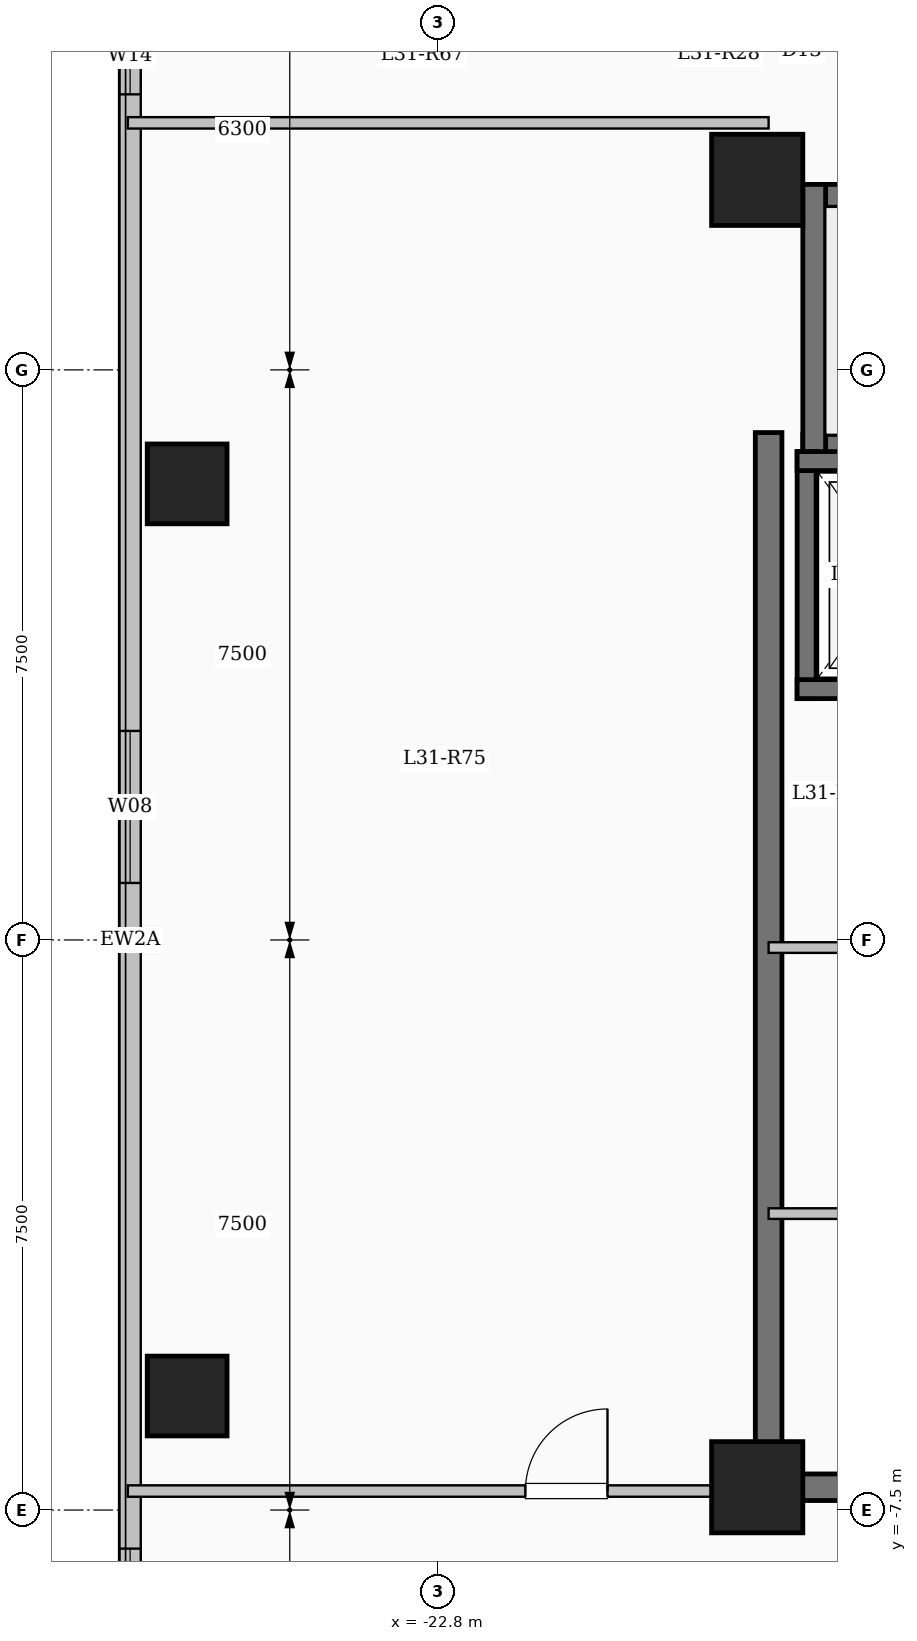
"""IFC4 building model, lengths in metres.
Left out: names, types, materials, properties, quantities, classifications, styles, units other than length and angle.
Written with IfcOpenShell. Run it as: python <this file> out.ifc"""

import sys

from ifc_helpers import new_model, si_unit, direction, frame, frame_2d, origin, origin_2d, place, context, subcontext, project, spatial, rectangle, extrude, element, fill, save


model = new_model("IFC4")
c1 = context("Model", 3, precision=1e-05, world=origin(), true_north=direction((0.0, 1.0)))
c2 = subcontext(c1, "Body", "Model", "MODEL_VIEW")
j1 = project(units=[si_unit("LENGTHUNIT", "METRE"), si_unit("PLANEANGLEUNIT", "RADIAN")], contexts=[c1])
p1 = place(None, origin())
s1 = spatial("IfcSite", under=j1, at=p1, CompositionType="ELEMENT")
p2 = place(p1, origin())
s2 = spatial("IfcBuilding", under=s1, at=p2, CompositionType="ELEMENT")
p3 = place(p2, frame((0.0, 0.0, 115.15)))
s3 = spatial("IfcBuildingStorey", under=s2, at=p3, CompositionType="ELEMENT", Elevation=115.15)
for number, where, z_axis, x_axis in (
    (1, (-18.6, -7.2, 0.0), (0.0, 0.0, 1.0), (1.0, 0.0, 0.0)),
    (2, (-18.6, 10.0, 0.0), (0.0, 0.0, 1.0), (1.0, 0.0, 0.0)),
):
    element("IfcColumn", number, at=place(p3, frame(where, z_axis=z_axis, x_axis=x_axis)), inside=s3, PredefinedType="COLUMN", context=c2, shape_type="SweptSolid", body=[
        extrude(rectangle(XDim=1.2, YDim=1.2, at=origin_2d()), origin(), (0.0, 0.0, 1.0), 3.35),
    ])
for number, where, z_axis, x_axis in (
    (3, (-26.1, -6.0, 0.0), (0.0, 0.0, 1.0), (1.0, 0.0, 0.0)),
    (4, (-26.1, 6.0, 0.0), (0.0, 0.0, 1.0), (1.0, 0.0, 0.0)),
):
    element("IfcColumn", number, at=place(p3, frame(where, z_axis=z_axis, x_axis=x_axis)), inside=s3, PredefinedType="COLUMN", context=c2, shape_type="SweptSolid", body=[
        extrude(rectangle(XDim=1.05, YDim=1.05, at=origin_2d()), origin(), (0.0, 0.0, 1.0), 3.35),
    ])
p4 = place(p3, frame((-26.85, -17.85, 0.0), z_axis=(0.0, 0.0, 1.0), x_axis=(0.0, 1.0, 0.0)))
e5 = element("IfcWall", 5, at=p4, inside=s3, PredefinedType="SOLIDWALL", context=c2, shape_type="SweptSolid", body=[
    extrude(rectangle(XDim=35.7, YDim=0.28, at=frame_2d((17.85, 0.0))), origin(), (0.0, 0.0, 1.0), 3.05),
])
p5 = place(p4, frame((2.55, 0.0, 0.9)))
e6 = element("IfcOpeningElement", 6, at=p5, cuts=e5, PredefinedType="OPENING", context=c2, shape_type="SweptSolid", body=[
    extrude(rectangle(XDim=2.4, YDim=1.8, at=frame_2d((1.2, 0.9))), frame((0.0, 0.15, 0.0), z_axis=(0.0, -1.0, 0.0), x_axis=(1.0, 0.0, 0.0)), (0.0, 0.0, 1.0), 0.3),
])
p6 = place(p4, frame((8.343, 0.0, 0.9)))
e7 = element("IfcOpeningElement", 7, at=p6, cuts=e5, PredefinedType="OPENING", context=c2, shape_type="SweptSolid", body=[
    extrude(rectangle(XDim=1.5, YDim=1.65, at=frame_2d((0.75, 0.825))), frame((0.0, 0.15, 0.0), z_axis=(0.0, -1.0, 0.0), x_axis=(1.0, 0.0, 0.0)), (0.0, 0.0, 1.0), 0.3),
])
p7 = place(p4, frame((18.6, 0.0, 0.9)))
e8 = element("IfcOpeningElement", 8, at=p7, cuts=e5, PredefinedType="OPENING", context=c2, shape_type="SweptSolid", body=[
    extrude(rectangle(XDim=2.0, YDim=1.7, at=frame_2d((1.0, 0.85))), frame((0.0, 0.15, 0.0), z_axis=(0.0, -1.0, 0.0), x_axis=(1.0, 0.0, 0.0)), (0.0, 0.0, 1.0), 0.3),
])
p8 = place(p4, frame((28.975, 0.0, 0.95)))
e9 = element("IfcOpeningElement", 9, at=p8, cuts=e5, PredefinedType="OPENING", context=c2, shape_type="SweptSolid", body=[
    extrude(rectangle(XDim=1.0, YDim=1.5, at=frame_2d((0.5, 0.75))), frame((0.0, 0.15, 0.0), z_axis=(0.0, -1.0, 0.0), x_axis=(1.0, 0.0, 0.0)), (0.0, 0.0, 1.0), 0.3),
])
p9 = place(p4, frame((32.025, 0.0, 0.9)))
e10 = element("IfcOpeningElement", 10, at=p9, cuts=e5, PredefinedType="OPENING", context=c2, shape_type="SweptSolid", body=[
    extrude(rectangle(XDim=2.0, YDim=1.7, at=frame_2d((1.0, 0.85))), frame((0.0, 0.15, 0.0), z_axis=(0.0, -1.0, 0.0), x_axis=(1.0, 0.0, 0.0)), (0.0, 0.0, 1.0), 0.3),
])
p10 = place(p3, frame((-18.0, 9.79, 0.0), z_axis=(0.0, 0.0, 1.0), x_axis=(1.0, 0.0, 0.0)))
e11 = element("IfcWall", 11, at=p10, inside=s3, PredefinedType="SHEAR", context=c2, shape_type="SweptSolid", body=[
    extrude(rectangle(XDim=8.0, YDim=0.3, at=frame_2d((4.0, 0.0))), origin(), (0.0, 0.0, 1.0), 3.35),
])
p11 = place(p3, frame((-18.0, 6.5, 0.0), z_axis=(0.0, 0.0, 1.0), x_axis=(1.0, 0.0, 0.0)))
e12 = element("IfcWall", 12, at=p11, inside=s3, PredefinedType="SHEAR", context=c2, shape_type="SweptSolid", body=[
    extrude(rectangle(XDim=8.0, YDim=0.3, at=frame_2d((4.0, 0.0))), origin(), (0.0, 0.0, 1.0), 3.35),
])
p12 = place(p11, frame((6.45, 0.0, 0.0)))
e13 = element("IfcOpeningElement", 13, at=p12, cuts=e12, PredefinedType="OPENING", context=c2, shape_type="SweptSolid", body=[
    extrude(rectangle(XDim=1.0, YDim=2.15, at=frame_2d((0.5, 1.075))), frame((0.0, 0.16, 0.0), z_axis=(0.0, -1.0, 0.0), x_axis=(1.0, 0.0, 0.0)), (0.0, 0.0, 1.0), 0.32),
])
p13 = place(p3, frame((-17.85, 6.35, 0.0), z_axis=(0.0, 0.0, 1.0), x_axis=(0.0, 1.0, 0.0)))
e14 = element("IfcWall", 14, at=p13, inside=s3, PredefinedType="SHEAR", context=c2, shape_type="SweptSolid", body=[
    extrude(rectangle(XDim=3.59, YDim=0.3, at=frame_2d((1.795, 0.0))), origin(), (0.0, 0.0, 1.0), 3.35),
])
p14 = place(p3, frame((-17.95, 3.175, 0.0), z_axis=(0.0, 0.0, 1.0), x_axis=(0.0, 1.0, 0.0)))
e15 = element("IfcWall", 15, at=p14, inside=s3, PredefinedType="SHEAR", context=c2, shape_type="SweptSolid", body=[
    extrude(rectangle(XDim=3.25, YDim=0.25, at=frame_2d((1.625, 0.0))), origin(), (0.0, 0.0, 1.0), 3.35),
])
for number, where, z_axis, x_axis in (
    (16, (-18.075, 3.3, 0.0), (0.0, 0.0, 1.0), (1.0, 0.0, 0.0)),
    (17, (-18.075, 6.3, 0.0), (0.0, 0.0, 1.0), (1.0, 0.0, 0.0)),
):
    element("IfcWall", number, at=place(p3, frame(where, z_axis=z_axis, x_axis=x_axis)), inside=s3, PredefinedType="SHEAR", context=c2, shape_type="SweptSolid", body=[
        extrude(rectangle(XDim=2.55, YDim=0.25, at=frame_2d((1.275, 0.0))), origin(), (0.0, 0.0, 1.0), 3.35),
    ])
p15 = place(p3, frame((-18.45, -7.375, 0.0), z_axis=(0.0, 0.0, 1.0), x_axis=(0.0, 1.0, 0.0)))
e18 = element("IfcWall", 18, at=p15, inside=s3, PredefinedType="SHEAR", context=c2, shape_type="SweptSolid", body=[
    extrude(rectangle(XDim=14.05, YDim=0.35, at=frame_2d((7.025, 0.0))), origin(), (0.0, 0.0, 1.0), 3.35),
])
p16 = place(p3, frame((-18.625, -7.2, 0.0), z_axis=(0.0, 0.0, 1.0), x_axis=(1.0, 0.0, 0.0)))
e19 = element("IfcWall", 19, at=p16, inside=s3, PredefinedType="SHEAR", context=c2, shape_type="SweptSolid", body=[
    extrude(rectangle(XDim=8.55, YDim=0.35, at=frame_2d((4.275, 0.0))), origin(), (0.0, 0.0, 1.0), 3.35),
])
p17 = place(p3, frame((-18.45, -3.6, 0.0), z_axis=(0.0, 0.0, 1.0), x_axis=(1.0, 0.0, 0.0)))
e20 = element("IfcWall", 20, at=p17, inside=s3, PredefinedType="PARTITIONING", context=c2, shape_type="SweptSolid", body=[
    extrude(rectangle(XDim=3.05, YDim=0.14, at=frame_2d((1.525, 0.0))), origin(), (0.0, 0.0, 1.0), 3.05),
])
p18 = place(p17, frame((1.05, 0.0, 0.0)))
e21 = element("IfcOpeningElement", 21, at=p18, cuts=e20, PredefinedType="OPENING", context=c2, shape_type="SweptSolid", body=[
    extrude(rectangle(XDim=0.9, YDim=2.08, at=frame_2d((0.45, 1.04))), frame((0.0, 0.08, 0.0), z_axis=(0.0, -1.0, 0.0), x_axis=(1.0, 0.0, 0.0)), (0.0, 0.0, 1.0), 0.16),
])
p19 = place(p3, frame((-18.45, -0.1, 0.0), z_axis=(0.0, 0.0, 1.0), x_axis=(1.0, 0.0, 0.0)))
e22 = element("IfcWall", 22, at=p19, inside=s3, PredefinedType="PARTITIONING", context=c2, shape_type="SweptSolid", body=[
    extrude(rectangle(XDim=3.05, YDim=0.14, at=frame_2d((1.525, 0.0))), origin(), (0.0, 0.0, 1.0), 3.05),
])
p20 = place(p19, frame((1.05, 0.0, 0.0)))
e23 = element("IfcOpeningElement", 23, at=p20, cuts=e22, PredefinedType="OPENING", context=c2, shape_type="SweptSolid", body=[
    extrude(rectangle(XDim=0.9, YDim=2.08, at=frame_2d((0.45, 1.04))), frame((0.0, 0.08, 0.0), z_axis=(0.0, -1.0, 0.0), x_axis=(1.0, 0.0, 0.0)), (0.0, 0.0, 1.0), 0.16),
])
p21 = place(p3, frame((-26.88, -7.25, 0.0), z_axis=(0.0, 0.0, 1.0), x_axis=(1.0, 0.0, 0.0)))
e24 = element("IfcWall", 24, at=p21, inside=s3, PredefinedType="PARTITIONING", context=c2, shape_type="SweptSolid", body=[
    extrude(rectangle(XDim=8.43, YDim=0.15, at=frame_2d((4.215, 0.0))), origin(), (0.0, 0.0, 1.0), 3.05),
])
p22 = place(p21, frame((5.23, 0.0, 0.0)))
e25 = element("IfcOpeningElement", 25, at=p22, cuts=e24, PredefinedType="OPENING", context=c2, shape_type="SweptSolid", body=[
    extrude(rectangle(XDim=1.08, YDim=2.15, at=frame_2d((0.54, 1.075))), frame((0.0, 0.085, 0.0), z_axis=(0.0, -1.0, 0.0), x_axis=(1.0, 0.0, 0.0)), (0.0, 0.0, 1.0), 0.17),
])
p23 = place(p3, frame((-26.88, 10.75, 0.0), z_axis=(0.0, 0.0, 1.0), x_axis=(1.0, 0.0, 0.0)))
e26 = element("IfcWall", 26, at=p23, inside=s3, PredefinedType="PARTITIONING", context=c2, shape_type="SweptSolid", body=[
    extrude(rectangle(XDim=8.43, YDim=0.15, at=frame_2d((4.215, 0.0))), origin(), (0.0, 0.0, 1.0), 3.05),
])
p24 = place(p6, origin())
e27 = element("IfcWindow", 27, at=p24, inside=s3, PartitioningType="SINGLE_PANEL", PredefinedType="WINDOW", context=c2, shape_type="SweptSolid", body=[
    extrude(rectangle(XDim=1.5, YDim=1.65, at=frame_2d((0.75, 0.825))), frame((0.0, 0.03, 0.0), z_axis=(0.0, -1.0, 0.0), x_axis=(1.0, 0.0, 0.0)), (0.0, 0.0, 1.0), 0.06),
])
fill(e7, e27)
p25 = place(p7, origin())
e28 = element("IfcWindow", 28, at=p25, inside=s3, PartitioningType="SINGLE_PANEL", PredefinedType="WINDOW", context=c2, shape_type="SweptSolid", body=[
    extrude(rectangle(XDim=2.0, YDim=1.7, at=frame_2d((1.0, 0.85))), frame((0.0, 0.03, 0.0), z_axis=(0.0, -1.0, 0.0), x_axis=(1.0, 0.0, 0.0)), (0.0, 0.0, 1.0), 0.06),
])
fill(e8, e28)
p26 = place(p8, origin())
e29 = element("IfcWindow", 29, at=p26, inside=s3, PartitioningType="SINGLE_PANEL", PredefinedType="WINDOW", context=c2, shape_type="SweptSolid", body=[
    extrude(rectangle(XDim=1.0, YDim=1.5, at=frame_2d((0.5, 0.75))), frame((0.0, 0.03, 0.0), z_axis=(0.0, -1.0, 0.0), x_axis=(1.0, 0.0, 0.0)), (0.0, 0.0, 1.0), 0.06),
])
fill(e9, e29)
p27 = place(p22, origin())
e30 = element("IfcDoor", 30, at=p27, inside=s3, OperationType="SINGLE_SWING_RIGHT", PredefinedType="DOOR", context=c2, shape_type="SweptSolid", body=[
    extrude(rectangle(XDim=1.08, YDim=2.15, at=frame_2d((0.54, 1.075))), frame((0.0, 0.025, 0.0), z_axis=(0.0, -1.0, 0.0), x_axis=(1.0, 0.0, 0.0)), (0.0, 0.0, 1.0), 0.05),
])
fill(e25, e30)
save(model, sys.argv[1])
